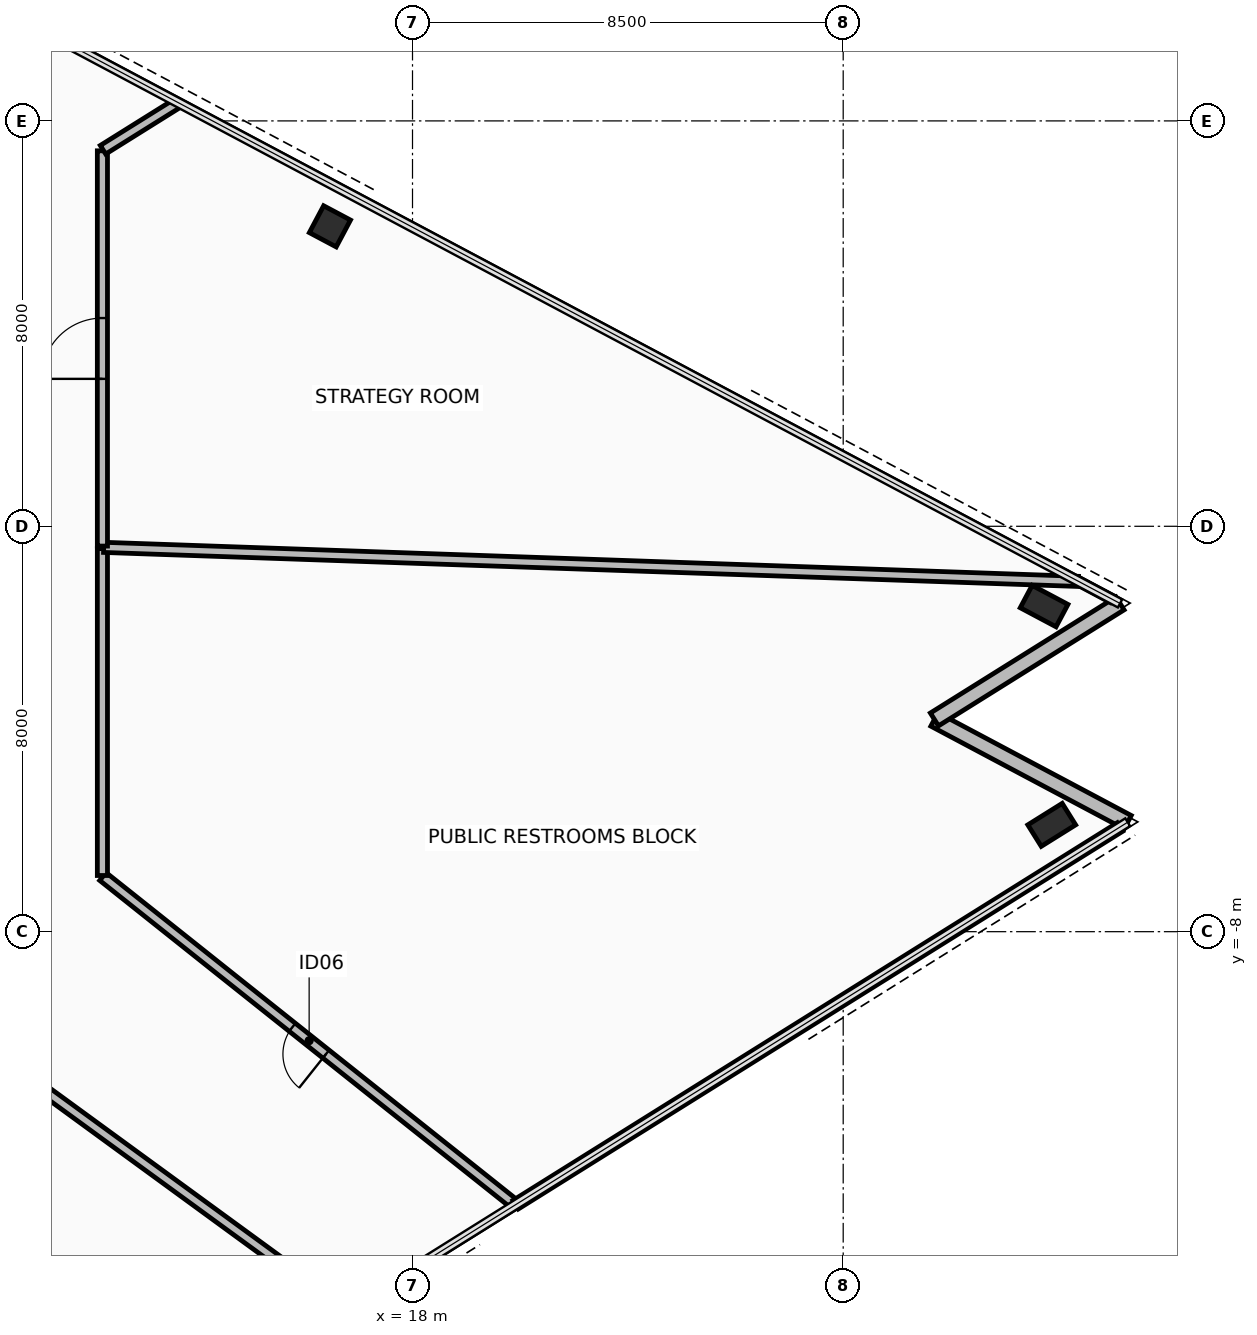
"""IFC4 building model, lengths in metres.
Left out: names, types, materials, properties, quantities, classifications, styles, units other than length and angle.
Written with IfcOpenShell. Run it as: python <this file> out.ifc"""

import sys

from ifc_helpers import new_model, si_unit, direction, frame, frame_2d, origin, origin_2d, place, context, subcontext, project, spatial, rectangle, hollow_rectangle, extrude, element, fill, save


model = new_model("IFC4")
c1 = context("Model", 3, precision=1e-05, world=origin(), true_north=direction((0.0, 1.0)))
c2 = subcontext(c1, "Body", "Model", "MODEL_VIEW")
j1 = project(units=[si_unit("LENGTHUNIT", "METRE"), si_unit("PLANEANGLEUNIT", "RADIAN")], contexts=[c1])
p1 = place(None, origin())
s1 = spatial("IfcSite", under=j1, at=p1, CompositionType="ELEMENT")
p2 = place(p1, origin())
s2 = spatial("IfcBuilding", under=s1, at=p2, CompositionType="ELEMENT")
p3 = place(p2, frame((0.0, 0.0, 138.8)))
s3 = spatial("IfcBuildingStorey", under=s2, at=p3, CompositionType="ELEMENT", Elevation=138.8)
for number, where, z_axis, x_axis in (
    (1, (30.615, -5.892, 0.0), (0.0, 0.0, 1.0), (0.848, 0.53, 0.0)),
    (2, (30.465, -1.575, 0.0), (0.0, 0.0, 1.0), (-0.883, 0.469, 0.0)),
):
    element("IfcColumn", number, at=place(p3, frame(where, z_axis=z_axis, x_axis=x_axis)), inside=s3, PredefinedType="COLUMN", context=c2, shape_type="SweptSolid", body=[
        extrude(hollow_rectangle(XDim=0.5, YDim=0.8, WallThickness=0.04, at=origin_2d()), origin(), (0.0, 0.0, 1.0), 3.6),
    ])
p4 = place(p3, frame((16.37, 5.919, -0.19), z_axis=(0.0, 0.0, 1.0), x_axis=(-0.88294841224, 0.469470021751, 0.0)))
e3 = element("IfcColumn", 3, at=p4, inside=s3, PredefinedType="COLUMN", context=c2, shape_type="SweptSolid", body=[
    extrude(hollow_rectangle(XDim=0.6, YDim=0.6, WallThickness=0.036, at=origin_2d()), origin(), (0.0, 0.0, 1.0), 3.79),
])
p5 = place(p3, frame((32.115, -5.84, 0.0), z_axis=(0.0, 0.0, 1.0), x_axis=(-0.882945167019, 0.469476125099, 0.0)))
e4 = element("IfcWall", 4, at=p5, inside=s3, PredefinedType="STANDARD", context=c2, shape_type="SweptSolid", body=[
    extrude(rectangle(XDim=4.32, YDim=0.3, at=frame_2d((2.16, 0.0))), origin(), (0.0, 0.0, 1.0), 2.705),
])
p6 = place(p3, frame((28.3, -3.812, 0.0), z_axis=(0.0, 0.0, 1.0), x_axis=(0.848042749904, 0.529927819929, 0.0)))
e5 = element("IfcWall", 5, at=p6, inside=s3, PredefinedType="STANDARD", context=c2, shape_type="SweptSolid", body=[
    extrude(rectangle(XDim=4.32, YDim=0.3, at=frame_2d((2.16, 0.0))), origin(), (0.0, 0.0, 1.0), 2.705),
])
p7 = place(p3, frame((9.985, -10.585, 0.0), z_axis=(0.0, 0.0, 1.0), x_axis=(0.807835985814, -0.589407346429, 0.0)))
e6 = element("IfcWall", 6, at=p7, inside=s3, PredefinedType="PARTITIONING", context=c2, shape_type="SweptSolid", body=[
    extrude(rectangle(XDim=8.301, YDim=0.2, at=frame_2d((4.151, 0.0))), origin(), (0.0, 0.0, 1.0), 2.705),
])
p8 = place(p3, frame((20.03, -13.391, 0.0), z_axis=(0.0, 0.0, 1.0), x_axis=(-0.782379652936, 0.622801797261, 0.0)))
e7 = element("IfcWall", 7, at=p8, inside=s3, PredefinedType="PARTITIONING", context=c2, shape_type="SweptSolid", body=[
    extrude(rectangle(XDim=10.405, YDim=0.2, at=frame_2d((5.203, 0.0))), origin(), (0.0, 0.0, 1.0), 2.705),
])
p9 = place(p8, frame((4.777, 0.0, 0.0)))
e8 = element("IfcOpeningElement", 8, at=p9, cuts=e7, PredefinedType="OPENING", context=c2, shape_type="SweptSolid", body=[
    extrude(rectangle(XDim=0.85, YDim=2.1, at=frame_2d((0.425, 1.05))), frame((0.0, 0.11, 0.0), z_axis=(0.0, -1.0, 0.0), x_axis=(1.0, 0.0, 0.0)), (0.0, 0.0, 1.0), 0.22),
])
p10 = place(p3, frame((11.88, -6.891, 0.0), z_axis=(0.0, 0.0, 1.0), x_axis=(0.0, 1.0, 0.0)))
e9 = element("IfcWall", 9, at=p10, inside=s3, PredefinedType="PARTITIONING", context=c2, shape_type="SweptSolid", body=[
    extrude(rectangle(XDim=6.451, YDim=0.2, at=frame_2d((3.225, 0.0))), origin(), (0.0, 0.0, 1.0), 2.855),
])
p11 = place(p3, frame((11.906, -0.416, 0.0), z_axis=(0.0, 0.0, 1.0), x_axis=(0.999390899128, -0.034897431724, 0.0)))
e10 = element("IfcWall", 10, at=p11, inside=s3, PredefinedType="PARTITIONING", context=c2, shape_type="SweptSolid", body=[
    extrude(rectangle(XDim=19.246, YDim=0.2, at=frame_2d((9.623, 0.0))), origin(), (0.0, 0.0, 1.0), 2.705),
])
p12 = place(p3, frame((31.151, -1.09, 0.0), z_axis=(0.0, 0.0, 1.0), x_axis=(0.883026217121, -0.469323662175, 0.0)))
e11 = element("IfcWall", 11, at=p12, inside=s3, PredefinedType="PARTITIONING", context=c2, shape_type="SweptSolid", body=[
    extrude(rectangle(XDim=0.742, YDim=0.15, at=frame_2d((0.371, 0.0))), origin(), (0.0, 0.0, 1.0), 3.41),
])
p13 = place(p3, frame((31.963, -5.935, 0.0), z_axis=(0.0, 0.0, 1.0), x_axis=(-0.848057783803, -0.529903760442, 0.0)))
e12 = element("IfcWall", 12, at=p13, inside=s3, PredefinedType="PARTITIONING", context=c2, shape_type="SweptSolid", body=[
    extrude(rectangle(XDim=14.065, YDim=0.2, at=frame_2d((7.032, 0.0))), origin(), (0.0, 0.0, 1.0), 3.41),
])
p14 = place(p3, frame((11.88, -0.391, 0.0), z_axis=(0.0, 0.0, 1.0), x_axis=(0.0, 1.0, 0.0)))
e13 = element("IfcWall", 13, at=p14, inside=s3, PredefinedType="PARTITIONING", context=c2, shape_type="SweptSolid", body=[
    extrude(rectangle(XDim=7.8, YDim=0.2, at=frame_2d((3.9, 0.0))), origin(), (0.0, 0.0, 1.0), 2.855),
])
p15 = place(p14, frame((3.3, 0.0, 0.0)))
e14 = element("IfcOpeningElement", 14, at=p15, cuts=e13, PredefinedType="OPENING", context=c2, shape_type="SweptSolid", body=[
    extrude(rectangle(XDim=1.2, YDim=2.15, at=frame_2d((0.6, 1.075))), frame((0.0, 0.11, 0.0), z_axis=(0.0, -1.0, 0.0), x_axis=(1.0, 0.0, 0.0)), (0.0, 0.0, 1.0), 0.22),
])
p16 = place(p3, frame((11.892, 7.431, 0.0), z_axis=(0.0, 0.0, 1.0), x_axis=(0.848045643795, 0.529923188811, 0.0)))
e15 = element("IfcWall", 15, at=p16, inside=s3, PredefinedType="PARTITIONING", context=c2, shape_type="SweptSolid", body=[
    extrude(rectangle(XDim=1.738, YDim=0.2, at=frame_2d((0.869, 0.0))), origin(), (0.0, 0.0, 1.0), 2.705),
])
p17 = place(p9, origin())
e16 = element("IfcDoor", 16, at=p17, inside=s3, OperationType="SINGLE_SWING_RIGHT", PredefinedType="DOOR", context=c2, shape_type="SweptSolid", body=[
    extrude(rectangle(XDim=0.85, YDim=2.1, at=frame_2d((0.425, 1.05))), frame((0.0, 0.025, 0.0), z_axis=(0.0, -1.0, 0.0), x_axis=(1.0, 0.0, 0.0)), (0.0, 0.0, 1.0), 0.05),
])
fill(e8, e16)
p18 = place(p15, origin())
e17 = element("IfcDoor", 17, at=p18, inside=s3, OperationType="SINGLE_SWING_LEFT", PredefinedType="DOOR", context=c2, shape_type="SweptSolid", body=[
    extrude(rectangle(XDim=1.2, YDim=2.15, at=frame_2d((0.6, 1.075))), frame((0.0, 0.025, 0.0), z_axis=(0.0, -1.0, 0.0), x_axis=(1.0, 0.0, 0.0)), (0.0, 0.0, 1.0), 0.05),
])
fill(e14, e17)
save(model, sys.argv[1])
